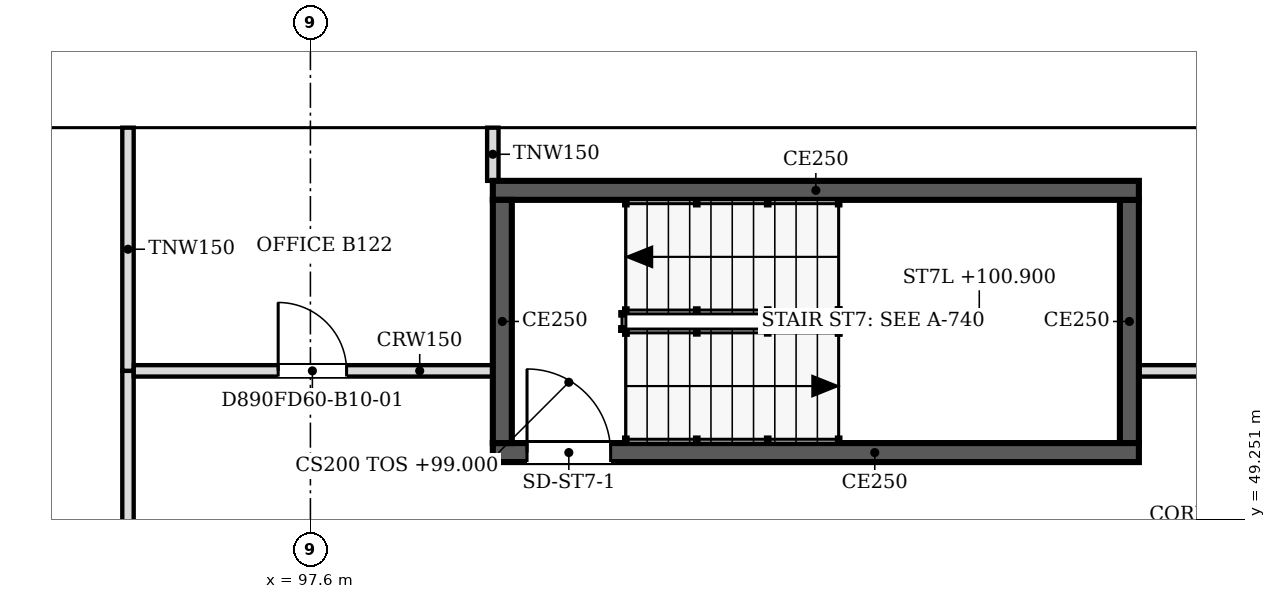
"""IFC4 building model, lengths in metres.
Left out: names, types, materials, properties, quantities, classifications, styles, units other than length and angle.
Written with IfcOpenShell. Run it as: python <this file> out.ifc"""

import sys

from ifc_helpers import new_model, si_unit, direction, frame, frame_2d, origin, place, context, subcontext, project, spatial, polyline, rectangle, outline, extrude, faceted_brep, source, transform, mapped, element, fill, save


model = new_model("IFC4")
c1 = context("Model", 3, precision=1e-05, world=origin(), true_north=direction((0.0, 1.0)))
c2 = subcontext(c1, "Body", "Model", "MODEL_VIEW")
j1 = project(units=[si_unit("LENGTHUNIT", "METRE"), si_unit("PLANEANGLEUNIT", "RADIAN")], contexts=[c1])
p1 = place(None, origin())
s1 = spatial("IfcSite", under=j1, at=p1, CompositionType="ELEMENT")
p2 = place(p1, origin())
s2 = spatial("IfcBuilding", under=s1, at=p2, CompositionType="ELEMENT")
p3 = place(p2, frame((0.0, 0.0, 99.0)))
s3 = spatial("IfcBuildingStorey", under=s2, at=p3, CompositionType="ELEMENT", Elevation=99.0)
m1 = source(origin(), c2, "Body", "SweptSolid", [
    extrude(outline(polyline([(3.05, 0.0), (6.1, 3.8), (3.05, 7.6), (0.0, 3.8), (3.05, 0.0)])), frame((0.0, 0.25, 0.0), z_axis=(0.0, -1.0, 0.0), x_axis=(1.0, 0.0, 0.0)), (0.0, 0.0, 1.0), 0.5),
])
p4 = place(p3, frame((109.8, 54.65, -3.8), z_axis=(0.0, 0.0, 1.0), x_axis=(-1.0, 0.0, 0.0)))
e1 = element("IfcWall", 1, at=p4, inside=s3, PredefinedType="SOLIDWALL", context=c2, shape_type="MappedRepresentation", body=[
    mapped(m1, transform((0.0, 0.0, 0.0), scale=1.0)),
])
m2 = source(origin(), c2, "Body", "SweptSolid", [
    extrude(outline(polyline([(3.05, 0.399), (5.78, 3.8), (3.05, 7.201), (0.321, 3.8), (3.05, 0.399)])), frame((0.0, 0.26, 0.0), z_axis=(0.0, -1.0, 0.0), x_axis=(1.0, 0.0, 0.0)), (0.0, 0.0, 1.0), 0.52),
])
p5 = place(p4, origin())
e2 = element("IfcOpeningElement", 2, at=p5, cuts=e1, PredefinedType="OPENING", context=c2, shape_type="MappedRepresentation", body=[
    mapped(m2, transform((0.0, 0.0, 0.0), scale=1.0)),
])
m3 = source(origin(), c2, "Body", "Brep", [
    faceted_brep([(3.05, -0.25, 0.0), (6.1, -0.25, 3.8), (6.1, -0.25, 3.8), (3.05, -0.25, 7.6), (0.0, -0.25, 3.8), (0.0, 0.25, 3.8), (3.05, 0.25, 7.6), (6.1, 0.25, 3.8), (6.1, 0.25, 3.8), (3.05, 0.25, 0.0)], [[[0, 1, 2, 3, 4]], [[5, 6, 7, 8, 9]], [[9, 8, 1, 0]], [[7, 6, 3, 2]], [[6, 5, 4, 3]], [[5, 9, 0, 4]], [[1, 8, 7, 2]]]),
])
p6 = place(p3, frame((103.7, 54.65, -3.8), z_axis=(0.0, 0.0, 1.0), x_axis=(-1.0, 0.0, 0.0)))
e3 = element("IfcWall", 3, at=p6, inside=s3, PredefinedType="SOLIDWALL", context=c2, shape_type="MappedRepresentation", body=[
    mapped(m3, transform((0.0, 0.0, 0.0), scale=1.0)),
])
p7 = place(p6, origin())
e4 = element("IfcOpeningElement", 4, at=p7, cuts=e3, PredefinedType="OPENING", context=c2, shape_type="MappedRepresentation", body=[
    mapped(m2, transform((0.0, 0.0, 0.0), scale=1.0)),
])
m4 = source(origin(), c2, "Body", "Brep", [
    faceted_brep([(3.05, -0.25, 0.0), (6.053, -0.25, 3.8), (3.05, -0.25, 7.6), (0.0, -0.25, 3.8), (0.0, 0.25, 3.8), (3.05, 0.25, 7.6), (6.007, 0.25, 3.859), (6.007, 0.25, 3.741), (3.05, 0.25, 0.0), (6.053, 0.0, 3.8)], [[[0, 1, 2, 3]], [[4, 5, 6, 7, 8]], [[8, 7, 9, 1, 0]], [[6, 5, 2, 1, 9]], [[5, 4, 3, 2]], [[4, 8, 0, 3]], [[9, 7, 6]]]),
])
p8 = place(p3, frame((97.6, 54.65, -3.8), z_axis=(0.0, 0.0, 1.0), x_axis=(-1.0, 0.0, 0.0)))
e5 = element("IfcWall", 5, at=p8, inside=s3, PredefinedType="SOLIDWALL", context=c2, shape_type="MappedRepresentation", body=[
    mapped(m4, transform((0.0, 0.0, 0.0), scale=1.0)),
])
m5 = source(origin(), c2, "Body", "SweptSolid", [
    extrude(outline(polyline([(3.049, 0.401), (5.735, 3.8), (3.049, 7.199), (0.321, 3.8), (3.049, 0.401)])), frame((0.0, 0.26, 0.0), z_axis=(0.0, -1.0, 0.0), x_axis=(1.0, 0.0, 0.0)), (0.0, 0.0, 1.0), 0.52),
])
p9 = place(p8, origin())
e6 = element("IfcOpeningElement", 6, at=p9, cuts=e5, PredefinedType="OPENING", context=c2, shape_type="MappedRepresentation", body=[
    mapped(m5, transform((0.0, 0.0, 0.0), scale=1.0)),
])
p10 = place(p2, frame((0.0, 0.0, 102.8)))
s4 = spatial("IfcBuildingStorey", under=s2, at=p10, CompositionType="ELEMENT", Elevation=102.8)
p11 = place(p10, frame((112.85, 54.65, -3.8), z_axis=(0.0, 0.0, 1.0), x_axis=(-1.0, 0.0, 0.0)))
e7 = element("IfcWall", 7, at=p11, inside=s4, PredefinedType="SOLIDWALL", context=c2, shape_type="MappedRepresentation", body=[
    mapped(m1, transform((0.0, 0.0, 0.0), scale=1.0)),
])
p12 = place(p11, origin())
e8 = element("IfcOpeningElement", 8, at=p12, cuts=e7, PredefinedType="OPENING", context=c2, shape_type="MappedRepresentation", body=[
    mapped(m2, transform((0.0, 0.0, 0.0), scale=1.0)),
])
p13 = place(p10, frame((106.75, 54.65, -3.8), z_axis=(0.0, 0.0, 1.0), x_axis=(-1.0, 0.0, 0.0)))
e9 = element("IfcWall", 9, at=p13, inside=s4, PredefinedType="SOLIDWALL", context=c2, shape_type="MappedRepresentation", body=[
    mapped(m1, transform((0.0, 0.0, 0.0), scale=1.0)),
])
p14 = place(p13, origin())
e10 = element("IfcOpeningElement", 10, at=p14, cuts=e9, PredefinedType="OPENING", context=c2, shape_type="MappedRepresentation", body=[
    mapped(m2, transform((0.0, 0.0, 0.0), scale=1.0)),
])
p15 = place(p10, frame((100.65, 54.65, -3.8), z_axis=(0.0, 0.0, 1.0), x_axis=(-1.0, 0.0, 0.0)))
e11 = element("IfcWall", 11, at=p15, inside=s4, PredefinedType="SOLIDWALL", context=c2, shape_type="MappedRepresentation", body=[
    mapped(m3, transform((0.0, 0.0, 0.0), scale=1.0)),
])
p16 = place(p15, origin())
e12 = element("IfcOpeningElement", 12, at=p16, cuts=e11, PredefinedType="OPENING", context=c2, shape_type="MappedRepresentation", body=[
    mapped(m2, transform((0.0, 0.0, 0.0), scale=1.0)),
])
m6 = source(origin(), c2, "Body", "Brep", [
    faceted_brep([(3.003, -0.25, 0.0), (3.05, -0.25, 0.06), (3.05, -0.25, 7.54), (3.003, -0.25, 7.6), (0.0, -0.25, 3.8), (0.0, 0.25, 3.8), (2.957, 0.25, 7.541), (2.957, 0.25, 0.059), (3.003, 0.0, 0.0), (3.003, 0.0, 7.6)], [[[0, 1, 2, 3, 4]], [[5, 6, 7]], [[1, 0, 8]], [[9, 3, 2]], [[6, 5, 4, 3, 9]], [[5, 7, 8, 0, 4]], [[1, 8, 7, 6, 9, 2]]]),
])
p17 = place(p10, frame((94.55, 54.65, -3.8), z_axis=(0.0, 0.0, 1.0), x_axis=(-1.0, 0.0, 0.0)))
e13 = element("IfcWall", 13, at=p17, inside=s4, PredefinedType="SOLIDWALL", context=c2, shape_type="MappedRepresentation", body=[
    mapped(m6, transform((0.0, 0.0, 0.0), scale=1.0)),
])
m7 = source(origin(), c2, "Body", "SweptSolid", [
    extrude(outline(polyline([(2.803, 6.944), (0.319, 3.8), (2.803, 0.656), (2.803, 6.944)])), frame((0.0, 0.26, 0.0), z_axis=(0.0, -1.0, 0.0), x_axis=(1.0, 0.0, 0.0)), (0.0, 0.0, 1.0), 0.52),
])
p18 = place(p17, origin())
e14 = element("IfcOpeningElement", 14, at=p18, cuts=e13, PredefinedType="OPENING", context=c2, shape_type="MappedRepresentation", body=[
    mapped(m7, transform((0.0, 0.0, 0.0), scale=1.0)),
])
p19 = place(p3, frame((108.5, 50.125, 0.0), z_axis=(0.0, 0.0, 1.0), x_axis=(-1.0, 0.0, 0.0)))
e15 = element("IfcWall", 15, at=p19, inside=s3, PredefinedType="SOLIDWALL", context=c2, shape_type="SweptSolid", body=[
    extrude(rectangle(XDim=8.5, YDim=0.25, at=frame_2d((4.25, 0.0))), origin(), (0.0, 0.0, 1.0), 3.8),
])
m8 = source(origin(), c2, "Body", "SweptSolid", [
    extrude(rectangle(XDim=1.1, YDim=2.1, at=frame_2d((0.55, 1.05))), frame((0.0, 0.135, 0.0), z_axis=(0.0, -1.0, 0.0), x_axis=(1.0, 0.0, 0.0)), (0.0, 0.0, 1.0), 0.27),
])
p20 = place(p19, frame((6.95, 0.0, 0.0)))
e16 = element("IfcOpeningElement", 16, at=p20, cuts=e15, PredefinedType="OPENING", context=c2, shape_type="MappedRepresentation", body=[
    mapped(m8, transform((0.0, 0.0, 0.0), scale=1.0)),
])
p21 = place(p3, frame((100.125, 50.25, 0.0), z_axis=(0.0, 0.0, 1.0), x_axis=(0.0, 1.0, 0.0)))
e17 = element("IfcWall", 17, at=p21, inside=s3, PredefinedType="SOLIDWALL", context=c2, shape_type="SweptSolid", body=[
    extrude(rectangle(XDim=3.2, YDim=0.25, at=frame_2d((1.6, 0.0))), origin(), (0.0, 0.0, 1.0), 3.8),
])
p22 = place(p3, frame((100.0, 53.575, 0.0), z_axis=(0.0, 0.0, 1.0), x_axis=(1.0, 0.0, 0.0)))
e18 = element("IfcWall", 18, at=p22, inside=s3, PredefinedType="SOLIDWALL", context=c2, shape_type="SweptSolid", body=[
    extrude(rectangle(XDim=8.5, YDim=0.25, at=frame_2d((4.25, 0.0))), origin(), (0.0, 0.0, 1.0), 3.8),
])
p23 = place(p3, frame((108.375, 53.45, 0.0), z_axis=(0.0, 0.0, 1.0), x_axis=(0.0, -1.0, 0.0)))
e19 = element("IfcWall", 19, at=p23, inside=s3, PredefinedType="SOLIDWALL", context=c2, shape_type="SweptSolid", body=[
    extrude(rectangle(XDim=3.2, YDim=0.25, at=frame_2d((1.6, 0.0))), origin(), (0.0, 0.0, 1.0), 3.8),
])
p24 = place(p3, frame((95.2, 36.6, 0.0), z_axis=(0.0, 0.0, 1.0), x_axis=(0.0, 1.0, 0.0)))
e20 = element("IfcWall", 20, at=p24, inside=s3, PredefinedType="PARTITIONING", context=c2, shape_type="SweptSolid", body=[
    extrude(rectangle(XDim=14.6, YDim=0.15, at=frame_2d((7.3, 0.0))), origin(), (0.0, 0.0, 1.0), 3.067),
])
m9 = source(origin(), c2, "Body", "SweptSolid", [
    extrude(rectangle(XDim=1.0, YDim=2.1, at=frame_2d((0.5, 1.05))), frame((0.0, 0.085, 0.0), z_axis=(0.0, -1.0, 0.0), x_axis=(1.0, 0.0, 0.0)), (0.0, 0.0, 1.0), 0.17),
])
p25 = place(p24, frame((11.301, 0.0, 0.0)))
e21 = element("IfcOpeningElement", 21, at=p25, cuts=e20, PredefinedType="OPENING", context=c2, shape_type="MappedRepresentation", body=[
    mapped(m9, transform((0.0, 0.0, 0.0), scale=1.0)),
])
p26 = place(p24, frame((4.0, 0.0, 0.0)))
e22 = element("IfcOpeningElement", 22, at=p26, cuts=e20, PredefinedType="OPENING", context=c2, shape_type="MappedRepresentation", body=[
    mapped(m9, transform((0.0, 0.0, 0.0), scale=1.0)),
])
p27 = place(p3, frame((95.2, 51.201, 0.0), z_axis=(0.0, 0.0, 1.0), x_axis=(0.0, 1.0, 0.0)))
e23 = element("IfcWall", 23, at=p27, inside=s3, PredefinedType="PARTITIONING", context=c2, shape_type="SweptSolid", body=[
    extrude(rectangle(XDim=3.199, YDim=0.15, at=frame_2d((1.6, 0.0))), origin(), (0.0, 0.0, 1.0), 3.067),
])
p28 = place(p3, frame((95.276, 51.2, 0.0), z_axis=(0.0, 0.0, 1.0), x_axis=(1.0, 0.0, 0.0)))
e24 = element("IfcWall", 24, at=p28, inside=s3, PredefinedType="PARTITIONING", context=c2, shape_type="SweptSolid", body=[
    extrude(rectangle(XDim=4.724, YDim=0.15, at=frame_2d((2.362, 0.0))), origin(), (0.0, 0.0, 1.0), 3.067),
])
m10 = source(origin(), c2, "Body", "SweptSolid", [
    extrude(rectangle(XDim=0.9, YDim=2.1, at=frame_2d((0.45, 1.05))), frame((0.0, 0.085, 0.0), z_axis=(0.0, -1.0, 0.0), x_axis=(1.0, 0.0, 0.0)), (0.0, 0.0, 1.0), 0.17),
])
p29 = place(p28, frame((1.9, 0.0, 0.0)))
e25 = element("IfcOpeningElement", 25, at=p29, cuts=e24, PredefinedType="OPENING", context=c2, shape_type="MappedRepresentation", body=[
    mapped(m10, transform((0.0, 0.0, 0.0), scale=1.0)),
])
p30 = place(p3, frame((108.5, 51.2, 0.0), z_axis=(0.0, 0.0, 1.0), x_axis=(1.0, 0.0, 0.0)))
e26 = element("IfcWall", 26, at=p30, inside=s3, PredefinedType="PARTITIONING", context=c2, shape_type="SweptSolid", body=[
    extrude(rectangle(XDim=13.5, YDim=0.15, at=frame_2d((6.75, 0.0))), origin(), (0.0, 0.0, 1.0), 3.067),
])
p31 = place(p3, frame((100.0, 53.7, 0.0), z_axis=(0.0, 0.0, 1.0), x_axis=(0.0, 1.0, 0.0)))
e27 = element("IfcWall", 27, at=p31, inside=s3, PredefinedType="PARTITIONING", context=c2, shape_type="SweptSolid", body=[
    extrude(rectangle(XDim=0.7, YDim=0.15, at=frame_2d((0.35, 0.0))), origin(), (0.0, 0.0, 1.0), 3.067),
])
m11 = source(origin(), c2, "Body", "SweptSolid", [
    extrude(rectangle(XDim=1.1, YDim=2.1, at=frame_2d((0.55, 1.05))), frame((0.0, 0.025, 0.0), z_axis=(0.0, -1.0, 0.0), x_axis=(1.0, 0.0, 0.0)), (0.0, 0.0, 1.0), 0.05),
])
p32 = place(p20, origin())
e28 = element("IfcDoor", 28, at=p32, inside=s3, OperationType="SINGLE_SWING_RIGHT", PredefinedType="DOOR", context=c2, shape_type="MappedRepresentation", body=[
    mapped(m11, transform((0.0, 0.0, 0.0), scale=1.0)),
])
fill(e16, e28)
m12 = source(origin(), c2, "Body", "SweptSolid", [
    extrude(rectangle(XDim=0.9, YDim=2.1, at=frame_2d((0.45, 1.05))), frame((0.0, 0.025, 0.0), z_axis=(0.0, -1.0, 0.0), x_axis=(1.0, 0.0, 0.0)), (0.0, 0.0, 1.0), 0.05),
])
p33 = place(p29, origin())
e29 = element("IfcDoor", 29, at=p33, inside=s3, OperationType="SINGLE_SWING_LEFT", PredefinedType="DOOR", context=c2, shape_type="MappedRepresentation", body=[
    mapped(m12, transform((0.0, 0.0, 0.0), scale=1.0)),
])
fill(e25, e29)
save(model, sys.argv[1])
